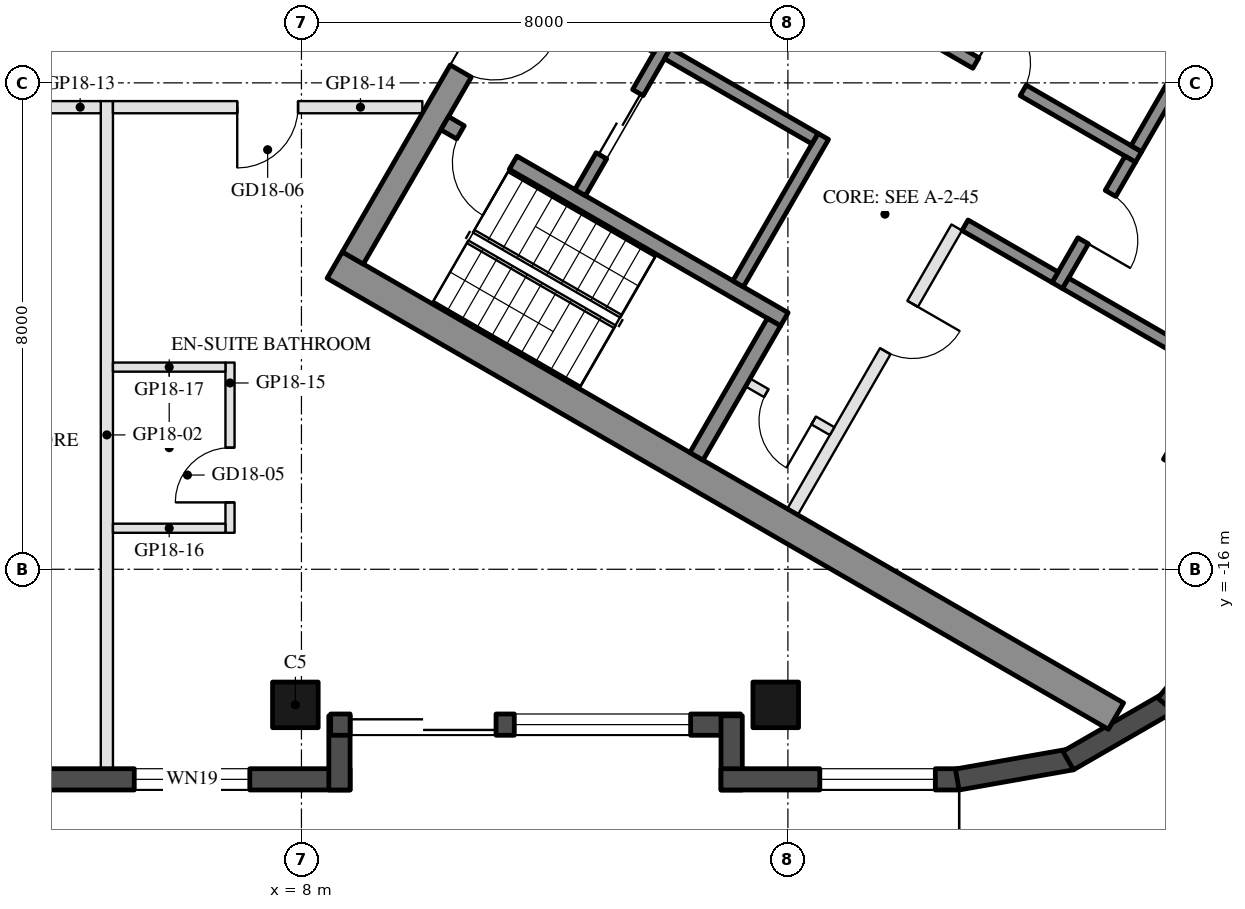
"""IFC4 building model, lengths in metres.
Left out: names, types, materials, properties, quantities, classifications, styles, units other than length and angle.
Written with IfcOpenShell. Run it as: python <this file> out.ifc"""

import sys

from ifc_helpers import new_model, si_unit, direction, frame, frame_2d, origin, origin_2d, place, context, subcontext, project, spatial, rectangle, hollow_rectangle, extrude, element, fill, save


model = new_model("IFC4")
c1 = context("Model", 3, precision=1e-05, world=origin(), true_north=direction((0.0, 1.0)))
c2 = subcontext(c1, "Body", "Model", "MODEL_VIEW")
j1 = project(units=[si_unit("LENGTHUNIT", "METRE"), si_unit("PLANEANGLEUNIT", "RADIAN")], contexts=[c1])
p1 = place(None, origin())
s1 = spatial("IfcSite", under=j1, at=p1, CompositionType="ELEMENT")
p2 = place(p1, origin())
s2 = spatial("IfcBuilding", under=s1, at=p2, CompositionType="ELEMENT")
p3 = place(p2, frame((0.0, 0.0, 191.0)))
s3 = spatial("IfcBuildingStorey", under=s2, at=p3, CompositionType="ELEMENT", Elevation=191.0)
for number, where, z_axis, x_axis in (
    (1, (7.9, -18.23, 0.0), (0.0, 0.0, 1.0), (-1.0, 0.0, 0.0)),
    (2, (15.8, -18.23, 0.0), (0.0, 0.0, 1.0), (-1.0, 0.0, 0.0)),
):
    element("IfcColumn", number, at=place(p3, frame(where, z_axis=z_axis, x_axis=x_axis)), inside=s3, PredefinedType="COLUMN", context=c2, shape_type="SweptSolid", body=[
        extrude(hollow_rectangle(XDim=0.75, YDim=0.75, WallThickness=0.035, at=origin_2d()), origin(), (0.0, 0.0, 1.0), 3.7),
    ])
p4 = place(p3, frame((23.729, -13.7, 0.0), z_axis=(0.0, 0.0, 1.0), x_axis=(0.5, 0.866025403784, 0.0)))
e3 = element("IfcColumn", 3, at=p4, inside=s3, PredefinedType="COLUMN", context=c2, shape_type="SweptSolid", body=[
    extrude(hollow_rectangle(XDim=2.4, YDim=2.2, WallThickness=0.06, at=origin_2d()), origin(), (0.0, 0.0, 1.0), 3.7),
])
p5 = place(p3, frame((-0.9, -19.455, 0.0), z_axis=(0.0, 0.0, 1.0), x_axis=(1.0, 0.0, 0.0)))
e4 = element("IfcWall", 4, at=p5, inside=s3, PredefinedType="SOLIDWALL", context=c2, shape_type="SweptSolid", body=[
    extrude(rectangle(XDim=9.7, YDim=0.35, at=frame_2d((4.85, 0.0))), origin(), (0.0, 0.0, 1.0), 3.55),
])
p6 = place(p5, frame((6.15, 0.0, 0.3)))
e5 = element("IfcOpeningElement", 5, at=p6, cuts=e4, PredefinedType="OPENING", context=c2, shape_type="SweptSolid", body=[
    extrude(rectangle(XDim=1.9, YDim=2.65, at=frame_2d((0.95, 1.325))), frame((0.0, 0.185, 0.0), z_axis=(0.0, -1.0, 0.0), x_axis=(1.0, 0.0, 0.0)), (0.0, 0.0, 1.0), 0.37),
])
p7 = place(p3, frame((8.625, -19.63, 0.0), z_axis=(0.0, 0.0, 1.0), x_axis=(0.0, 1.0, 0.0)))
e6 = element("IfcWall", 6, at=p7, inside=s3, PredefinedType="SOLIDWALL", context=c2, shape_type="SweptSolid", body=[
    extrude(rectangle(XDim=1.22, YDim=0.35, at=frame_2d((0.61, 0.0))), origin(), (0.0, 0.0, 1.0), 3.55),
])
p8 = place(p3, frame((8.48, -18.555, 0.0), z_axis=(0.0, 0.0, 1.0), x_axis=(1.0, 0.0, 0.0)))
e7 = element("IfcWall", 7, at=p8, inside=s3, PredefinedType="SOLIDWALL", context=c2, shape_type="SweptSolid", body=[
    extrude(rectangle(XDim=6.74, YDim=0.35, at=frame_2d((3.37, 0.0))), origin(), (0.0, 0.0, 1.0), 3.55),
])
p9 = place(p8, frame((0.32, 0.0, 0.0)))
e8 = element("IfcOpeningElement", 8, at=p9, cuts=e7, PredefinedType="OPENING", context=c2, shape_type="SweptSolid", body=[
    extrude(rectangle(XDim=2.4, YDim=2.4, at=frame_2d((1.2, 1.2))), frame((0.0, 0.185, 0.0), z_axis=(0.0, -1.0, 0.0), x_axis=(1.0, 0.0, 0.0)), (0.0, 0.0, 1.0), 0.37),
])
p10 = place(p8, frame((3.02, 0.0, 0.3)))
e9 = element("IfcOpeningElement", 9, at=p10, cuts=e7, PredefinedType="OPENING", context=c2, shape_type="SweptSolid", body=[
    extrude(rectangle(XDim=2.9, YDim=2.65, at=frame_2d((1.45, 1.325))), frame((0.0, 0.185, 0.0), z_axis=(0.0, -1.0, 0.0), x_axis=(1.0, 0.0, 0.0)), (0.0, 0.0, 1.0), 0.37),
])
p11 = place(p3, frame((15.075, -18.41, 0.0), z_axis=(0.0, 0.0, 1.0), x_axis=(0.0, -1.0, 0.0)))
e10 = element("IfcWall", 10, at=p11, inside=s3, PredefinedType="SOLIDWALL", context=c2, shape_type="SweptSolid", body=[
    extrude(rectangle(XDim=1.22, YDim=0.35, at=frame_2d((0.61, 0.0))), origin(), (0.0, 0.0, 1.0), 3.55),
])
p12 = place(p3, frame((14.9, -19.455, 0.0), z_axis=(0.0, 0.0, 1.0), x_axis=(1.0, 0.0, 0.0)))
e11 = element("IfcWall", 11, at=p12, inside=s3, PredefinedType="SOLIDWALL", context=c2, shape_type="SweptSolid", body=[
    extrude(rectangle(XDim=3.916, YDim=0.35, at=frame_2d((1.958, 0.0))), origin(), (0.0, 0.0, 1.0), 3.55),
])
p13 = place(p12, frame((1.625, 0.0, 0.3)))
e12 = element("IfcOpeningElement", 12, at=p13, cuts=e11, PredefinedType="OPENING", context=c2, shape_type="SweptSolid", body=[
    extrude(rectangle(XDim=1.9, YDim=2.65, at=frame_2d((0.95, 1.325))), frame((0.0, 0.185, 0.0), z_axis=(0.0, -1.0, 0.0), x_axis=(1.0, 0.0, 0.0)), (0.0, 0.0, 1.0), 0.37),
])
p14 = place(p3, frame((18.785, -19.458, 0.0), z_axis=(0.0, 0.0, 1.0), x_axis=(0.984798995425, 0.173697837091, 0.0)))
e13 = element("IfcWall", 13, at=p14, inside=s3, PredefinedType="SOLIDWALL", context=c2, shape_type="SweptSolid", body=[
    extrude(rectangle(XDim=1.91, YDim=0.35, at=frame_2d((0.955, 0.0))), origin(), (0.0, 0.0, 1.0), 3.55),
])
for number, where, z_axis, x_axis in (
    (14, (20.61, -19.147, 0.0), (0.0, 0.0, 1.0), (0.866, 0.5, 0.0)),
    (15, (22.217, -18.231, 0.0), (0.0, 0.0, 1.0), (0.643, 0.766, 0.0)),
):
    element("IfcWall", number, at=place(p3, frame(where, z_axis=z_axis, x_axis=x_axis)), inside=s3, PredefinedType="SOLIDWALL", context=c2, shape_type="SweptSolid", body=[
        extrude(rectangle(XDim=1.91, YDim=0.35, at=frame_2d((0.955, 0.0))), origin(), (0.0, 0.0, 1.0), 3.55),
    ])
for number, where, z_axis, x_axis in (
    (16, (8.547, -10.997, 0.0), (0.0, 0.0, 1.0), (0.866, -0.5, 0.0)),
    (17, (13.797, -1.903, 0.0), (0.0, 0.0, 1.0), (0.866, -0.5, 0.0)),
):
    element("IfcWall", number, at=place(p3, frame(where, z_axis=z_axis, x_axis=x_axis)), inside=s3, PredefinedType="SHEAR", context=c2, shape_type="SweptSolid", body=[
        extrude(rectangle(XDim=14.837, YDim=0.5, at=frame_2d((7.418, 0.0))), origin(), (0.0, 0.0, 1.0), 3.5),
    ])
p15 = place(p3, frame((8.845, -10.88, 0.0), z_axis=(0.0, 0.0, 1.0), x_axis=(0.500004234368, 0.866022959057, 0.0)))
e18 = element("IfcWall", 18, at=p15, inside=s3, PredefinedType="SHEAR", context=c2, shape_type="SweptSolid", body=[
    extrude(rectangle(XDim=10.0, YDim=0.4, at=frame_2d((5.0, 0.0))), origin(), (0.0, 0.0, 1.0), 3.5),
])
p16 = place(p15, frame((3.55, 0.0, 0.0)))
e19 = element("IfcOpeningElement", 19, at=p16, cuts=e18, PredefinedType="OPENING", context=c2, shape_type="SweptSolid", body=[
    extrude(rectangle(XDim=1.1, YDim=2.1, at=frame_2d((0.55, 1.05))), frame((0.0, 0.21, 0.0), z_axis=(0.0, -1.0, 0.0), x_axis=(1.0, 0.0, 0.0)), (0.0, 0.0, 1.0), 0.42),
])
p17 = place(p15, frame((5.85, 0.0, 0.0)))
e20 = element("IfcOpeningElement", 20, at=p17, cuts=e18, PredefinedType="OPENING", context=c2, shape_type="SweptSolid", body=[
    extrude(rectangle(XDim=1.4, YDim=2.1, at=frame_2d((0.7, 1.05))), frame((0.0, 0.21, 0.0), z_axis=(0.0, -1.0, 0.0), x_axis=(1.0, 0.0, 0.0)), (0.0, 0.0, 1.0), 0.42),
])
p18 = place(p3, frame((10.356, -8.664, 0.0), z_axis=(0.0, 0.0, 1.0), x_axis=(0.866028629588, -0.499994412703, 0.0)))
e21 = element("IfcWall", 21, at=p18, inside=s3, PredefinedType="SHEAR", context=c2, shape_type="SweptSolid", body=[
    extrude(rectangle(XDim=6.45, YDim=0.25, at=frame_2d((3.225, 0.0))), origin(), (0.0, 0.0, 1.0), 3.5),
])
p19 = place(p18, frame((0.3, 0.0, 0.0)))
e22 = element("IfcOpeningElement", 22, at=p19, cuts=e21, PredefinedType="OPENING", context=c2, shape_type="SweptSolid", body=[
    extrude(rectangle(XDim=1.0, YDim=2.1, at=frame_2d((0.5, 1.05))), frame((0.0, 0.135, 0.0), z_axis=(0.0, -1.0, 0.0), x_axis=(1.0, 0.0, 0.0)), (0.0, 0.0, 1.0), 0.27),
])
p20 = place(p3, frame((14.496, -14.143, 0.0), z_axis=(0.0, 0.0, 1.0), x_axis=(0.500062241894, 0.865989465428, 0.0)))
e23 = element("IfcWall", 23, at=p20, inside=s3, PredefinedType="SHEAR", context=c2, shape_type="SweptSolid", body=[
    extrude(rectangle(XDim=2.55, YDim=0.25, at=frame_2d((1.275, 0.0))), origin(), (0.0, 0.0, 1.0), 3.5),
])
p21 = place(p3, frame((15.181, -11.305, 0.0), z_axis=(0.0, 0.0, 1.0), x_axis=(0.49994636267, 0.866056369097, 0.0)))
e24 = element("IfcWall", 24, at=p21, inside=s3, PredefinedType="SHEAR", context=c2, shape_type="SweptSolid", body=[
    extrude(rectangle(XDim=2.8, YDim=0.2, at=frame_2d((1.4, 0.0))), origin(), (0.0, 0.0, 1.0), 3.5),
])
p22 = place(p3, frame((12.583, -9.805, 0.0), z_axis=(0.0, 0.0, 1.0), x_axis=(0.49994636267, 0.866056369097, 0.0)))
e25 = element("IfcWall", 25, at=p22, inside=s3, PredefinedType="SHEAR", context=c2, shape_type="SweptSolid", body=[
    extrude(rectangle(XDim=2.8, YDim=0.2, at=frame_2d((1.4, 0.0))), origin(), (0.0, 0.0, 1.0), 3.5),
])
p23 = place(p22, frame((0.7, 0.0, 0.0)))
e26 = element("IfcOpeningElement", 26, at=p23, cuts=e25, PredefinedType="OPENING", context=c2, shape_type="SweptSolid", body=[
    extrude(rectangle(XDim=1.2, YDim=2.1, at=frame_2d((0.6, 1.05))), frame((0.0, 0.11, 0.0), z_axis=(0.0, -1.0, 0.0), x_axis=(1.0, 0.0, 0.0)), (0.0, 0.0, 1.0), 0.22),
])
p24 = place(p3, frame((11.768, -6.217, 0.0), z_axis=(0.0, 0.0, 1.0), x_axis=(0.866050077142, -0.499957262057, 0.0)))
e27 = element("IfcWall", 27, at=p24, inside=s3, PredefinedType="SHEAR", context=c2, shape_type="SweptSolid", body=[
    extrude(rectangle(XDim=2.4, YDim=0.2, at=frame_2d((1.2, 0.0))), origin(), (0.0, 0.0, 1.0), 3.5),
])
p25 = place(p3, frame((14.02, -7.517, 0.0), z_axis=(0.0, 0.0, 1.0), x_axis=(0.866034573852, -0.49998411664, 0.0)))
e28 = element("IfcWall", 28, at=p25, inside=s3, PredefinedType="SHEAR", context=c2, shape_type="SweptSolid", body=[
    extrude(rectangle(XDim=2.8, YDim=0.2, at=frame_2d((1.4, 0.0))), origin(), (0.0, 0.0, 1.0), 3.5),
])
p26 = place(p3, frame((12.968, -4.138, 0.0), z_axis=(0.0, 0.0, 1.0), x_axis=(0.866028328073, -0.49999493495, 0.0)))
e29 = element("IfcWall", 29, at=p26, inside=s3, PredefinedType="SHEAR", context=c2, shape_type="SweptSolid", body=[
    extrude(rectangle(XDim=10.16, YDim=0.2, at=frame_2d((5.08, 0.0))), origin(), (0.0, 0.0, 1.0), 3.5),
])
p27 = place(p26, frame((1.99, 0.0, 0.0)))
e30 = element("IfcOpeningElement", 30, at=p27, cuts=e29, PredefinedType="OPENING", context=c2, shape_type="SweptSolid", body=[
    extrude(rectangle(XDim=0.9, YDim=2.1, at=frame_2d((0.45, 1.05))), frame((0.0, 0.11, 0.0), z_axis=(0.0, -1.0, 0.0), x_axis=(1.0, 0.0, 0.0)), (0.0, 0.0, 1.0), 0.22),
])
p28 = place(p26, frame((7.07, 0.0, 0.0)))
e31 = element("IfcOpeningElement", 31, at=p28, cuts=e29, PredefinedType="OPENING", context=c2, shape_type="SweptSolid", body=[
    extrude(rectangle(XDim=0.9, YDim=2.1, at=frame_2d((0.45, 1.05))), frame((0.0, 0.11, 0.0), z_axis=(0.0, -1.0, 0.0), x_axis=(1.0, 0.0, 0.0)), (0.0, 0.0, 1.0), 0.22),
])
p29 = place(p3, frame((20.43, -11.333, 0.0), z_axis=(0.0, 0.0, 1.0), x_axis=(0.500001309137, 0.866024647952, 0.0)))
e32 = element("IfcWall", 32, at=p29, inside=s3, PredefinedType="SHEAR", context=c2, shape_type="SweptSolid", body=[
    extrude(rectangle(XDim=2.4, YDim=0.2, at=frame_2d((1.2, 0.0))), origin(), (0.0, 0.0, 1.0), 3.5),
])
p30 = place(p29, frame((0.85, 0.0, 0.0)))
e33 = element("IfcOpeningElement", 33, at=p30, cuts=e32, PredefinedType="OPENING", context=c2, shape_type="SweptSolid", body=[
    extrude(rectangle(XDim=0.9, YDim=2.1, at=frame_2d((0.45, 1.05))), frame((0.0, 0.11, 0.0), z_axis=(0.0, -1.0, 0.0), x_axis=(1.0, 0.0, 0.0)), (0.0, 0.0, 1.0), 0.22),
])
p31 = place(p3, frame((18.913, -10.342, 0.0), z_axis=(0.0, 0.0, 1.0), x_axis=(0.866038183914, -0.499977863513, 0.0)))
e34 = element("IfcWall", 34, at=p31, inside=s3, PredefinedType="SHEAR", context=c2, shape_type="SweptSolid", body=[
    extrude(rectangle(XDim=1.71, YDim=0.2, at=frame_2d((0.855, 0.0))), origin(), (0.0, 0.0, 1.0), 3.5),
])
p32 = place(p3, frame((21.73, -9.082, 0.0), z_axis=(0.0, 0.0, 1.0), x_axis=(0.50002537861, 0.866010750942, 0.0)))
e35 = element("IfcWall", 35, at=p32, inside=s3, PredefinedType="SHEAR", context=c2, shape_type="SweptSolid", body=[
    extrude(rectangle(XDim=2.0, YDim=0.2, at=frame_2d((1.0, 0.0))), origin(), (0.0, 0.0, 1.0), 3.5),
])
p33 = place(p3, frame((20.567, -11.297, 0.0), z_axis=(0.0, 0.0, 1.0), x_axis=(0.866055327414, -0.49994816717, 0.0)))
e36 = element("IfcWall", 36, at=p33, inside=s3, PredefinedType="SHEAR", context=c2, shape_type="SweptSolid", body=[
    extrude(rectangle(XDim=2.84, YDim=0.2, at=frame_2d((1.42, 0.0))), origin(), (0.0, 0.0, 1.0), 3.5),
])
p34 = place(p3, frame((16.076, -15.055, 0.0), z_axis=(0.0, 0.0, 1.0), x_axis=(0.499995103361, 0.866028230842, 0.0)))
e37 = element("IfcWall", 37, at=p34, inside=s3, PredefinedType="PARTITIONING", context=c2, shape_type="SweptSolid", body=[
    extrude(rectangle(XDim=5.4, YDim=0.2, at=frame_2d((2.7, 0.0))), origin(), (0.0, 0.0, 1.0), 3.5),
])
p35 = place(p34, frame((3.05, 0.0, 0.0)))
e38 = element("IfcOpeningElement", 38, at=p35, cuts=e37, PredefinedType="OPENING", context=c2, shape_type="SweptSolid", body=[
    extrude(rectangle(XDim=0.9, YDim=2.1, at=frame_2d((0.45, 1.05))), frame((0.0, 0.11, 0.0), z_axis=(0.0, -1.0, 0.0), x_axis=(1.0, 0.0, 0.0)), (0.0, 0.0, 1.0), 0.22),
])
p36 = place(p3, frame((15.342, -12.928, 0.0), z_axis=(0.0, 0.0, 1.0), x_axis=(0.865989903783, -0.500061482766, 0.0)))
e39 = element("IfcWall", 39, at=p36, inside=s3, PredefinedType="PARTITIONING", context=c2, shape_type="SweptSolid", body=[
    extrude(rectangle(XDim=1.6, YDim=0.15, at=frame_2d((0.8, 0.0))), origin(), (0.0, 0.0, 1.0), 3.5),
])
p37 = place(p36, frame((0.35, 0.0, 0.0)))
e40 = element("IfcOpeningElement", 40, at=p37, cuts=e39, PredefinedType="OPENING", context=c2, shape_type="SweptSolid", body=[
    extrude(rectangle(XDim=0.9, YDim=2.1, at=frame_2d((0.45, 1.05))), frame((0.0, 0.085, 0.0), z_axis=(0.0, -1.0, 0.0), x_axis=(1.0, 0.0, 0.0)), (0.0, 0.0, 1.0), 0.17),
])
p38 = place(p3, frame((4.8, -19.28, 0.0), z_axis=(0.0, 0.0, 1.0), x_axis=(0.0, 1.0, 0.0)))
e41 = element("IfcWall", 41, at=p38, inside=s3, PredefinedType="PARTITIONING", context=c2, shape_type="SweptSolid", body=[
    extrude(rectangle(XDim=10.98, YDim=0.2, at=frame_2d((5.49, 0.0))), origin(), (0.0, 0.0, 1.0), 3.06),
])
p39 = place(p3, frame((4.7, -8.4, 0.0), z_axis=(0.0, 0.0, 1.0), x_axis=(-1.0, 0.0, 0.0)))
e42 = element("IfcWall", 42, at=p39, inside=s3, PredefinedType="PARTITIONING", context=c2, shape_type="SweptSolid", body=[
    extrude(rectangle(XDim=2.826, YDim=0.2, at=frame_2d((1.413, 0.0))), origin(), (0.0, 0.0, 1.0), 2.95),
])
p40 = place(p39, frame((0.963, 0.0, 0.0)))
e43 = element("IfcOpeningElement", 43, at=p40, cuts=e42, PredefinedType="OPENING", context=c2, shape_type="SweptSolid", body=[
    extrude(rectangle(XDim=0.9, YDim=2.1, at=frame_2d((0.45, 1.05))), frame((0.0, 0.11, 0.0), z_axis=(0.0, -1.0, 0.0), x_axis=(1.0, 0.0, 0.0)), (0.0, 0.0, 1.0), 0.22),
])
p41 = place(p3, frame((9.988, -8.4, 0.0), z_axis=(0.0, 0.0, 1.0), x_axis=(-1.0, 0.0, 0.0)))
e44 = element("IfcWall", 44, at=p41, inside=s3, PredefinedType="PARTITIONING", context=c2, shape_type="SweptSolid", body=[
    extrude(rectangle(XDim=5.088, YDim=0.2, at=frame_2d((2.544, 0.0))), origin(), (0.0, 0.0, 1.0), 2.95),
])
p42 = place(p41, frame((2.044, 0.0, 0.0)))
e45 = element("IfcOpeningElement", 45, at=p42, cuts=e44, PredefinedType="OPENING", context=c2, shape_type="SweptSolid", body=[
    extrude(rectangle(XDim=1.0, YDim=2.1, at=frame_2d((0.5, 1.05))), frame((0.0, 0.11, 0.0), z_axis=(0.0, -1.0, 0.0), x_axis=(1.0, 0.0, 0.0)), (0.0, 0.0, 1.0), 0.22),
])
p43 = place(p3, frame((6.825, -15.4, 0.0), z_axis=(0.0, 0.0, 1.0), x_axis=(0.0, 1.0, 0.0)))
e46 = element("IfcWall", 46, at=p43, inside=s3, PredefinedType="PARTITIONING", context=c2, shape_type="SweptSolid", body=[
    extrude(rectangle(XDim=2.8, YDim=0.15, at=frame_2d((1.4, 0.0))), origin(), (0.0, 0.0, 1.0), 3.55),
])
p44 = place(p43, frame((0.5, 0.0, 0.0)))
e47 = element("IfcOpeningElement", 47, at=p44, cuts=e46, PredefinedType="OPENING", context=c2, shape_type="SweptSolid", body=[
    extrude(rectangle(XDim=0.9, YDim=2.1, at=frame_2d((0.45, 1.05))), frame((0.0, 0.085, 0.0), z_axis=(0.0, -1.0, 0.0), x_axis=(1.0, 0.0, 0.0)), (0.0, 0.0, 1.0), 0.17),
])
for number, where, z_axis, x_axis in (
    (48, (4.9, -15.325, 0.0), (0.0, 0.0, 1.0), (1.0, 0.0, 0.0)),
    (49, (4.9, -12.675, 0.0), (0.0, 0.0, 1.0), (1.0, 0.0, 0.0)),
):
    element("IfcWall", number, at=place(p3, frame(where, z_axis=z_axis, x_axis=x_axis)), inside=s3, PredefinedType="PARTITIONING", context=c2, shape_type="SweptSolid", body=[
        extrude(rectangle(XDim=1.85, YDim=0.15, at=frame_2d((0.925, 0.0))), origin(), (0.0, 0.0, 1.0), 3.55),
    ])
p45 = place(p6, origin())
e50 = element("IfcWindow", 50, at=p45, inside=s3, PartitioningType="SINGLE_PANEL", PredefinedType="WINDOW", context=c2, shape_type="SweptSolid", body=[
    extrude(rectangle(XDim=1.9, YDim=2.65, at=frame_2d((0.95, 1.325))), frame((0.0, 0.03, 0.0), z_axis=(0.0, -1.0, 0.0), x_axis=(1.0, 0.0, 0.0)), (0.0, 0.0, 1.0), 0.06),
])
fill(e5, e50)
p46 = place(p9, frame((2.4, 0.0, 0.0), z_axis=(0.0, 0.0, 1.0), x_axis=(-1.0, 0.0, 0.0)))
e51 = element("IfcDoor", 51, at=p46, inside=s3, OperationType="SLIDING_TO_LEFT", PredefinedType="DOOR", context=c2, shape_type="SweptSolid", body=[
    extrude(rectangle(XDim=2.4, YDim=2.4, at=frame_2d((1.2, 1.2))), frame((0.0, 0.025, 0.0), z_axis=(0.0, -1.0, 0.0), x_axis=(1.0, 0.0, 0.0)), (0.0, 0.0, 1.0), 0.05),
])
fill(e8, e51)
p47 = place(p10, origin())
e52 = element("IfcWindow", 52, at=p47, inside=s3, PartitioningType="SINGLE_PANEL", PredefinedType="WINDOW", context=c2, shape_type="SweptSolid", body=[
    extrude(rectangle(XDim=2.9, YDim=2.65, at=frame_2d((1.45, 1.325))), frame((0.0, 0.03, 0.0), z_axis=(0.0, -1.0, 0.0), x_axis=(1.0, 0.0, 0.0)), (0.0, 0.0, 1.0), 0.06),
])
fill(e9, e52)
p48 = place(p13, origin())
e53 = element("IfcWindow", 53, at=p48, inside=s3, PartitioningType="SINGLE_PANEL", PredefinedType="WINDOW", context=c2, shape_type="SweptSolid", body=[
    extrude(rectangle(XDim=1.9, YDim=2.65, at=frame_2d((0.95, 1.325))), frame((0.0, 0.03, 0.0), z_axis=(0.0, -1.0, 0.0), x_axis=(1.0, 0.0, 0.0)), (0.0, 0.0, 1.0), 0.06),
])
fill(e12, e53)
p49 = place(p23, origin())
e54 = element("IfcDoor", 54, at=p49, inside=s3, OperationType="DOUBLE_DOOR_SLIDING", PredefinedType="DOOR", context=c2, shape_type="SweptSolid", body=[
    extrude(rectangle(XDim=1.2, YDim=2.1, at=frame_2d((0.6, 1.05))), frame((0.0, 0.025, 0.0), z_axis=(0.0, -1.0, 0.0), x_axis=(1.0, 0.0, 0.0)), (0.0, 0.0, 1.0), 0.05),
])
fill(e26, e54)
p50 = place(p37, frame((0.9, 0.0, 0.0), z_axis=(0.0, 0.0, 1.0), x_axis=(-1.0, 0.0, 0.0)))
e55 = element("IfcDoor", 55, at=p50, inside=s3, OperationType="SINGLE_SWING_LEFT", PredefinedType="DOOR", context=c2, shape_type="SweptSolid", body=[
    extrude(rectangle(XDim=0.9, YDim=2.1, at=frame_2d((0.45, 1.05))), frame((0.0, 0.025, 0.0), z_axis=(0.0, -1.0, 0.0), x_axis=(1.0, 0.0, 0.0)), (0.0, 0.0, 1.0), 0.05),
])
fill(e40, e55)
p51 = place(p28, origin())
e56 = element("IfcDoor", 56, at=p51, inside=s3, OperationType="SINGLE_SWING_LEFT", PredefinedType="DOOR", context=c2, shape_type="SweptSolid", body=[
    extrude(rectangle(XDim=0.9, YDim=2.1, at=frame_2d((0.45, 1.05))), frame((0.0, 0.025, 0.0), z_axis=(0.0, -1.0, 0.0), x_axis=(1.0, 0.0, 0.0)), (0.0, 0.0, 1.0), 0.05),
])
fill(e31, e56)
p52 = place(p30, frame((0.9, 0.0, 0.0), z_axis=(0.0, 0.0, 1.0), x_axis=(-1.0, 0.0, 0.0)))
e57 = element("IfcDoor", 57, at=p52, inside=s3, OperationType="SINGLE_SWING_RIGHT", PredefinedType="DOOR", context=c2, shape_type="SweptSolid", body=[
    extrude(rectangle(XDim=0.9, YDim=2.1, at=frame_2d((0.45, 1.05))), frame((0.0, 0.025, 0.0), z_axis=(0.0, -1.0, 0.0), x_axis=(1.0, 0.0, 0.0)), (0.0, 0.0, 1.0), 0.05),
])
fill(e33, e57)
p53 = place(p35, frame((0.9, 0.0, 0.0), z_axis=(0.0, 0.0, 1.0), x_axis=(-1.0, 0.0, 0.0)))
e58 = element("IfcDoor", 58, at=p53, inside=s3, OperationType="SINGLE_SWING_LEFT", PredefinedType="DOOR", context=c2, shape_type="SweptSolid", body=[
    extrude(rectangle(XDim=0.9, YDim=2.1, at=frame_2d((0.45, 1.05))), frame((0.0, 0.025, 0.0), z_axis=(0.0, -1.0, 0.0), x_axis=(1.0, 0.0, 0.0)), (0.0, 0.0, 1.0), 0.05),
])
fill(e38, e58)
p54 = place(p16, frame((1.1, 0.0, 0.0), z_axis=(0.0, 0.0, 1.0), x_axis=(-1.0, 0.0, 0.0)))
e59 = element("IfcDoor", 59, at=p54, inside=s3, OperationType="SINGLE_SWING_LEFT", PredefinedType="DOOR", context=c2, shape_type="SweptSolid", body=[
    extrude(rectangle(XDim=1.1, YDim=2.1, at=frame_2d((0.55, 1.05))), frame((0.0, 0.025, 0.0), z_axis=(0.0, -1.0, 0.0), x_axis=(1.0, 0.0, 0.0)), (0.0, 0.0, 1.0), 0.05),
])
fill(e19, e59)
p55 = place(p19, frame((1.0, 0.0, 0.0), z_axis=(0.0, 0.0, 1.0), x_axis=(-1.0, 0.0, 0.0)))
e60 = element("IfcDoor", 60, at=p55, inside=s3, OperationType="SINGLE_SWING_LEFT", PredefinedType="DOOR", context=c2, shape_type="SweptSolid", body=[
    extrude(rectangle(XDim=1.0, YDim=2.1, at=frame_2d((0.5, 1.05))), frame((0.0, 0.025, 0.0), z_axis=(0.0, -1.0, 0.0), x_axis=(1.0, 0.0, 0.0)), (0.0, 0.0, 1.0), 0.05),
])
fill(e22, e60)
p56 = place(p44, origin())
e61 = element("IfcDoor", 61, at=p56, inside=s3, OperationType="SINGLE_SWING_LEFT", PredefinedType="DOOR", context=c2, shape_type="SweptSolid", body=[
    extrude(rectangle(XDim=0.9, YDim=2.1, at=frame_2d((0.45, 1.05))), frame((0.0, 0.025, 0.0), z_axis=(0.0, -1.0, 0.0), x_axis=(1.0, 0.0, 0.0)), (0.0, 0.0, 1.0), 0.05),
])
fill(e47, e61)
p57 = place(p42, origin())
e62 = element("IfcDoor", 62, at=p57, inside=s3, OperationType="SINGLE_SWING_RIGHT", PredefinedType="DOOR", context=c2, shape_type="SweptSolid", body=[
    extrude(rectangle(XDim=1.0, YDim=2.1, at=frame_2d((0.5, 1.05))), frame((0.0, 0.025, 0.0), z_axis=(0.0, -1.0, 0.0), x_axis=(1.0, 0.0, 0.0)), (0.0, 0.0, 1.0), 0.05),
])
fill(e45, e62)
save(model, sys.argv[1])
